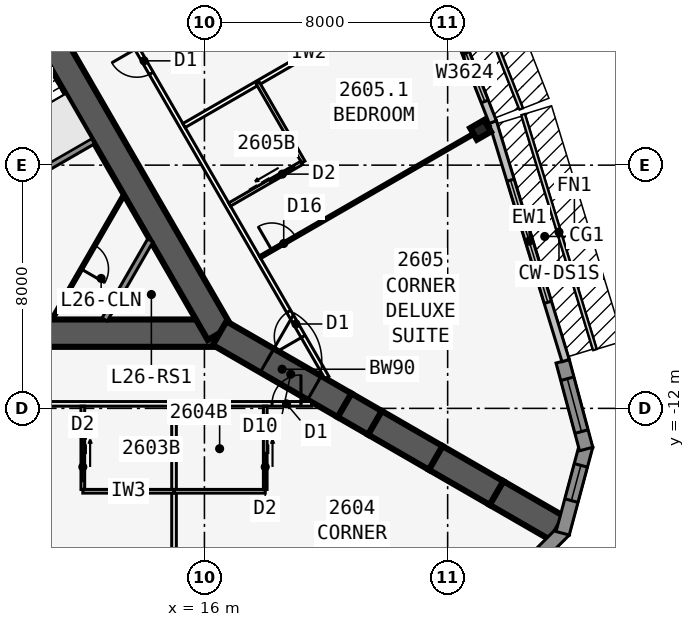
"""IFC4 building model, lengths in metres.
Left out: names, types, materials, properties, quantities, classifications, styles, units other than length and angle.
Written with IfcOpenShell. Run it as: python <this file> out.ifc"""

import sys

from ifc_helpers import new_model, si_unit, direction, frame, frame_2d, origin, origin_2d, place, context, subcontext, project, spatial, polyline, rectangle, i_section, outline, extrude, element, fill, save


model = new_model("IFC4")
c1 = context("Model", 3, precision=1e-05, world=origin(), true_north=direction((0.0, 1.0)))
c2 = subcontext(c1, "Body", "Model", "MODEL_VIEW")
j1 = project(units=[si_unit("LENGTHUNIT", "METRE"), si_unit("PLANEANGLEUNIT", "RADIAN")], contexts=[c1])
p1 = place(None, origin())
s1 = spatial("IfcSite", under=j1, at=p1, CompositionType="ELEMENT")
p2 = place(p1, origin())
s2 = spatial("IfcBuilding", under=s1, at=p2, CompositionType="ELEMENT")
p3 = place(p2, frame((0.0, 0.0, 99.9)))
s3 = spatial("IfcBuildingStorey", under=s2, at=p3, CompositionType="ELEMENT", Elevation=99.9)
p4 = place(p3, frame((-16.5, -9.526, 0.0), z_axis=(0.0, 0.0, 1.0), x_axis=(1.0, 0.0, 0.0)))
e1 = element("IfcWall", 1, at=p4, inside=s3, PredefinedType="SHEAR", context=c2, shape_type="SweptSolid", body=[
    extrude(rectangle(XDim=33.0, YDim=0.9, at=frame_2d((16.5, 0.0))), origin(), (0.0, 0.0, 1.0), 3.4),
])
p5 = place(p4, frame((14.05, 0.0, 0.0)))
e2 = element("IfcOpeningElement", 2, at=p5, cuts=e1, PredefinedType="OPENING", context=c2, shape_type="SweptSolid", body=[
    extrude(rectangle(XDim=1.8, YDim=2.13, at=frame_2d((0.9, 1.065))), frame((0.0, 0.46, 0.0), z_axis=(0.0, -1.0, 0.0), x_axis=(1.0, 0.0, 0.0)), (0.0, 0.0, 1.0), 0.92),
])
p6 = place(p3, frame((16.5, -9.526, 0.0), z_axis=(0.0, 0.0, 1.0), x_axis=(-0.499999749417, 0.866025548458, 0.0)))
e3 = element("IfcWall", 3, at=p6, inside=s3, PredefinedType="SHEAR", context=c2, shape_type="SweptSolid", body=[
    extrude(rectangle(XDim=33.0, YDim=0.9, at=frame_2d((16.5, 0.0))), origin(), (0.0, 0.0, 1.0), 3.4),
])
p7 = place(p6, frame((14.15, 0.0, 0.0)))
e4 = element("IfcOpeningElement", 4, at=p7, cuts=e3, PredefinedType="OPENING", context=c2, shape_type="SweptSolid", body=[
    extrude(rectangle(XDim=1.8, YDim=2.13, at=frame_2d((0.9, 1.065))), frame((0.0, 0.46, 0.0), z_axis=(0.0, -1.0, 0.0), x_axis=(1.0, 0.0, 0.0)), (0.0, 0.0, 1.0), 0.92),
])
p8 = place(p6, frame((12.6, 0.0, 0.0)))
e5 = element("IfcOpeningElement", 5, at=p8, cuts=e3, PredefinedType="OPENING", context=c2, shape_type="SweptSolid", body=[
    extrude(rectangle(XDim=1.0, YDim=2.13, at=frame_2d((0.5, 1.065))), frame((0.0, 0.46, 0.0), z_axis=(0.0, -1.0, 0.0), x_axis=(1.0, 0.0, 0.0)), (0.0, 0.0, 1.0), 0.92),
])
p9 = place(p3, frame((9.629, -4.775, 0.0), z_axis=(0.0, 0.0, 1.0), x_axis=(0.866022959057, 0.500004234368, 0.0)))
e6 = element("IfcWall", 6, at=p9, inside=s3, PredefinedType="SOLIDWALL", context=c2, shape_type="SweptSolid", body=[
    extrude(rectangle(XDim=3.125, YDim=0.2, at=frame_2d((1.562, 0.0))), origin(), (0.0, 0.0, 1.0), 3.15),
])
p10 = place(p3, frame((16.5, -9.526, 0.0), z_axis=(0.0, 0.0, 1.0), x_axis=(0.866031398331, -0.499989616998, 0.0)))
e7 = element("IfcWall", 7, at=p10, inside=s3, PredefinedType="SHEAR", context=c2, shape_type="SweptSolid", body=[
    extrude(rectangle(XDim=4.746, YDim=0.9, at=frame_2d((2.373, 0.0))), origin(), (0.0, 0.0, 1.0), 3.4),
])
p11 = place(p10, frame((1.8, 0.0, 0.0)))
e8 = element("IfcOpeningElement", 8, at=p11, cuts=e7, PredefinedType="OPENING", context=c2, shape_type="SweptSolid", body=[
    extrude(rectangle(XDim=1.8, YDim=2.13, at=frame_2d((0.9, 1.065))), frame((0.0, 0.46, 0.0), z_axis=(0.0, -1.0, 0.0), x_axis=(1.0, 0.0, 0.0)), (0.0, 0.0, 1.0), 0.92),
])
p12 = place(p3, frame((20.61, -11.899, 0.0), z_axis=(0.0, 0.0, 1.0), x_axis=(0.866009537788, -0.500027479704, 0.0)))
e9 = element("IfcWall", 9, at=p12, inside=s3, PredefinedType="SHEAR", context=c2, shape_type="SweptSolid", body=[
    extrude(rectangle(XDim=1.155, YDim=0.9, at=frame_2d((0.577, 0.0))), origin(), (0.0, 0.0, 1.0), 3.4),
])
for number, where, z_axis, x_axis in (
    (10, (21.61, -12.477, 0.0), (0.0, 0.0, 1.0), (0.866, -0.5, 0.0)),
    (11, (23.61, -13.631, 0.0), (0.0, 0.0, 1.0), (0.866, -0.5, 0.0)),
    (12, (25.61, -14.786, 0.0), (0.0, 0.0, 1.0), (0.866, -0.5, 0.0)),
):
    element("IfcWall", number, at=place(p3, frame(where, z_axis=z_axis, x_axis=x_axis)), inside=s3, PredefinedType="SHEAR", context=c2, shape_type="SweptSolid", body=[
        extrude(rectangle(XDim=2.309, YDim=0.9, at=frame_2d((1.155, 0.0))), origin(), (0.0, 0.0, 1.0), 3.4),
    ])
p13 = place(p3, frame((25.083, -2.839, 0.0), z_axis=(0.0, 0.0, 1.0), x_axis=(-0.5, 0.866025403784, 0.0)))
e13 = element("IfcColumn", 13, at=p13, inside=s3, PredefinedType="COLUMN", context=c2, shape_type="SweptSolid", body=[
    extrude(i_section(OverallWidth=0.442, OverallDepth=0.531, WebThickness=0.066, FlangeThickness=0.106, at=origin_2d()), origin(), (0.0, 0.0, 1.0), 3.4),
])
p14 = place(p3, frame((25.728, -18.12, 0.0), z_axis=(0.0, 0.0, 1.0), x_axis=(0.707025086683, 0.707188466253, 0.0)))
e14 = element("IfcWall", 14, at=p14, inside=s3, PredefinedType="SOLIDWALL", context=c2, shape_type="SweptSolid", body=[
    extrude(outline(polyline([(2.989, 0.225), (2.93, 0.225), (2.438, 0.093), (2.402, 0.225), (0.0, 0.225), (0.0, -0.225), (2.989, -0.225), (2.989, 0.225)])), origin(), (0.0, 0.0, 1.0), 3.15),
])
p15 = place(p14, frame((0.676, 0.0, 0.45)))
e15 = element("IfcOpeningElement", 15, at=p15, cuts=e14, PredefinedType="OPENING", context=c2, shape_type="SweptSolid", body=[
    extrude(rectangle(XDim=1.2, YDim=2.4, at=frame_2d((0.6, 1.2))), frame((0.0, 0.235, 0.0), z_axis=(0.0, -1.0, 0.0), x_axis=(1.0, 0.0, 0.0)), (0.0, 0.0, 1.0), 0.47),
])
p16 = place(p3, frame((27.783, -16.108, 0.0), z_axis=(0.0, 0.0, 1.0), x_axis=(0.258801419081, 0.965930548995, 0.0)))
e16 = element("IfcWall", 16, at=p16, inside=s3, PredefinedType="SOLIDWALL", context=c2, shape_type="SweptSolid", body=[
    extrude(outline(polyline([(2.989, 0.225), (0.586, 0.225), (0.551, 0.093), (0.06, 0.225), (0.0, 0.225), (0.0, -0.225), (2.989, -0.225), (2.989, 0.225)])), origin(), (0.0, 0.0, 1.0), 3.15),
])
p17 = place(p16, frame((1.113, 0.0, 0.45)))
e17 = element("IfcOpeningElement", 17, at=p17, cuts=e16, PredefinedType="OPENING", context=c2, shape_type="SweptSolid", body=[
    extrude(rectangle(XDim=1.2, YDim=2.4, at=frame_2d((0.6, 1.2))), frame((0.0, 0.235, 0.0), z_axis=(0.0, -1.0, 0.0), x_axis=(1.0, 0.0, 0.0)), (0.0, 0.0, 1.0), 0.47),
])
p18 = place(p3, frame((28.556, -13.337, 0.0), z_axis=(0.0, 0.0, 1.0), x_axis=(-0.258780998834, 0.965936019953, 0.0)))
e18 = element("IfcWall", 18, at=p18, inside=s3, PredefinedType="SOLIDWALL", context=c2, shape_type="SweptSolid", body=[
    extrude(rectangle(XDim=2.989, YDim=0.45, at=frame_2d((1.494, 0.0))), origin(), (0.0, 0.0, 1.0), 3.15),
])
p19 = place(p18, frame((0.594, 0.0, 0.45)))
e19 = element("IfcOpeningElement", 19, at=p19, cuts=e18, PredefinedType="OPENING", context=c2, shape_type="SweptSolid", body=[
    extrude(rectangle(XDim=1.8, YDim=2.4, at=frame_2d((0.9, 1.2))), frame((0.0, 0.235, 0.0), z_axis=(0.0, -1.0, 0.0), x_axis=(1.0, 0.0, 0.0)), (0.0, 0.0, 1.0), 0.47),
])
p20 = place(p3, frame((27.88, -10.429, 0.0), z_axis=(0.0, 0.0, 1.0), x_axis=(-0.2919790669, 0.956424709265, 0.0)))
e20 = element("IfcWall", 20, at=p20, inside=s3, PredefinedType="STANDARD", context=c2, shape_type="SweptSolid", body=[
    extrude(rectangle(XDim=8.211, YDim=0.25, at=frame_2d((4.105, 0.0))), origin(), (0.0, 0.0, 1.0), 3.15),
])
p21 = place(p20, frame((2.006, 0.0, 0.45)))
e21 = element("IfcOpeningElement", 21, at=p21, cuts=e20, PredefinedType="OPENING", context=c2, shape_type="SweptSolid", body=[
    extrude(rectangle(XDim=4.2, YDim=2.4, at=frame_2d((2.1, 1.2))), frame((0.0, 0.135, 0.0), z_axis=(0.0, -1.0, 0.0), x_axis=(1.0, 0.0, 0.0)), (0.0, 0.0, 1.0), 0.27),
])
p22 = place(p3, frame((25.486, -2.584, 0.0), z_axis=(0.0, 0.0, 1.0), x_axis=(-0.364013463868, 0.931393685894, 0.0)))
e22 = element("IfcWall", 22, at=p22, inside=s3, PredefinedType="STANDARD", context=c2, shape_type="SweptSolid", body=[
    extrude(rectangle(XDim=5.058, YDim=0.25, at=frame_2d((2.529, 0.0))), origin(), (0.0, 0.0, 1.0), 3.15),
])
p23 = place(p22, frame((0.729, 0.0, 0.45)))
e23 = element("IfcOpeningElement", 23, at=p23, cuts=e22, PredefinedType="OPENING", context=c2, shape_type="SweptSolid", body=[
    extrude(rectangle(XDim=3.6, YDim=2.4, at=frame_2d((1.8, 1.2))), frame((0.0, 0.135, 0.0), z_axis=(0.0, -1.0, 0.0), x_axis=(1.0, 0.0, 0.0)), (0.0, 0.0, 1.0), 0.27),
])
p24 = place(p3, frame((-19.527, -11.851, 0.0), z_axis=(0.0, 0.0, 1.0), x_axis=(1.0, 0.0, 0.0)))
e24 = element("IfcWall", 24, at=p24, inside=s3, PredefinedType="PARTITIONING", context=c2, shape_type="SweptSolid", body=[
    extrude(rectangle(XDim=39.054, YDim=0.15, at=frame_2d((19.527, 0.0))), origin(), (0.0, 0.0, 1.0), 3.15),
])
p25 = place(p24, frame((1.558, 0.0, 0.0)))
e25 = element("IfcOpeningElement", 25, at=p25, cuts=e24, PredefinedType="OPENING", context=c2, shape_type="SweptSolid", body=[
    extrude(rectangle(XDim=0.95, YDim=2.13, at=frame_2d((0.475, 1.065))), frame((0.0, 0.085, 0.0), z_axis=(0.0, -1.0, 0.0), x_axis=(1.0, 0.0, 0.0)), (0.0, 0.0, 1.0), 0.17),
])
p26 = place(p24, frame((11.552, 0.0, 0.0)))
e26 = element("IfcOpeningElement", 26, at=p26, cuts=e24, PredefinedType="OPENING", context=c2, shape_type="SweptSolid", body=[
    extrude(rectangle(XDim=0.95, YDim=2.13, at=frame_2d((0.475, 1.065))), frame((0.0, 0.085, 0.0), z_axis=(0.0, -1.0, 0.0), x_axis=(1.0, 0.0, 0.0)), (0.0, 0.0, 1.0), 0.17),
])
p27 = place(p24, frame((21.527, 0.0, 0.0)))
e27 = element("IfcOpeningElement", 27, at=p27, cuts=e24, PredefinedType="OPENING", context=c2, shape_type="SweptSolid", body=[
    extrude(rectangle(XDim=1.0, YDim=2.13, at=frame_2d((0.5, 1.065))), frame((0.0, 0.085, 0.0), z_axis=(0.0, -1.0, 0.0), x_axis=(1.0, 0.0, 0.0)), (0.0, 0.0, 1.0), 0.17),
])
p28 = place(p24, frame((26.552, 0.0, 0.0)))
e28 = element("IfcOpeningElement", 28, at=p28, cuts=e24, PredefinedType="OPENING", context=c2, shape_type="SweptSolid", body=[
    extrude(rectangle(XDim=0.95, YDim=2.13, at=frame_2d((0.475, 1.065))), frame((0.0, 0.085, 0.0), z_axis=(0.0, -1.0, 0.0), x_axis=(1.0, 0.0, 0.0)), (0.0, 0.0, 1.0), 0.17),
])
p29 = place(p24, frame((37.752, 0.0, 0.0)))
e29 = element("IfcOpeningElement", 29, at=p29, cuts=e24, PredefinedType="OPENING", context=c2, shape_type="SweptSolid", body=[
    extrude(rectangle(XDim=0.95, YDim=2.13, at=frame_2d((0.475, 1.065))), frame((0.0, 0.085, 0.0), z_axis=(0.0, -1.0, 0.0), x_axis=(1.0, 0.0, 0.0)), (0.0, 0.0, 1.0), 0.17),
])
p30 = place(p3, frame((15.0, -11.926, 0.0), z_axis=(0.0, 0.0, 1.0), x_axis=(0.0, -1.0, 0.0)))
e30 = element("IfcWall", 30, at=p30, inside=s3, PredefinedType="PARTITIONING", context=c2, shape_type="SweptSolid", body=[
    extrude(rectangle(XDim=8.72, YDim=0.15, at=frame_2d((4.36, 0.0))), origin(), (0.0, 0.0, 1.0), 2.05),
])
p31 = place(p3, frame((12.0, -14.726, 0.0), z_axis=(0.0, 0.0, 1.0), x_axis=(1.0, 0.0, 0.0)))
e31 = element("IfcWall", 31, at=p31, inside=s3, PredefinedType="PLUMBINGWALL", context=c2, shape_type="SweptSolid", body=[
    extrude(rectangle(XDim=3.0, YDim=0.12, at=frame_2d((1.5, 0.0))), origin(), (0.0, 0.0, 1.0), 3.15),
])
p32 = place(p3, frame((12.0, -11.926, 0.0), z_axis=(0.0, 0.0, 1.0), x_axis=(0.0, -1.0, 0.0)))
e32 = element("IfcWall", 32, at=p32, inside=s3, PredefinedType="PLUMBINGWALL", context=c2, shape_type="SweptSolid", body=[
    extrude(rectangle(XDim=2.74, YDim=0.12, at=frame_2d((1.37, 0.0))), origin(), (0.0, 0.0, 1.0), 3.15),
])
p33 = place(p32, frame((1.55, 0.0, 0.0)))
e33 = element("IfcOpeningElement", 33, at=p33, cuts=e32, PredefinedType="OPENING", context=c2, shape_type="SweptSolid", body=[
    extrude(rectangle(XDim=0.9, YDim=2.13, at=frame_2d((0.45, 1.065))), frame((0.0, 0.07, 0.0), z_axis=(0.0, -1.0, 0.0), x_axis=(1.0, 0.0, 0.0)), (0.0, 0.0, 1.0), 0.14),
])
p34 = place(p3, frame((15.0, -14.726, 0.0), z_axis=(0.0, 0.0, 1.0), x_axis=(1.0, 0.0, 0.0)))
e34 = element("IfcWall", 34, at=p34, inside=s3, PredefinedType="PLUMBINGWALL", context=c2, shape_type="SweptSolid", body=[
    extrude(rectangle(XDim=3.0, YDim=0.12, at=frame_2d((1.5, 0.0))), origin(), (0.0, 0.0, 1.0), 3.15),
])
p35 = place(p3, frame((18.0, -11.926, 0.0), z_axis=(0.0, 0.0, 1.0), x_axis=(0.0, -1.0, 0.0)))
e35 = element("IfcWall", 35, at=p35, inside=s3, PredefinedType="PLUMBINGWALL", context=c2, shape_type="SweptSolid", body=[
    extrude(rectangle(XDim=2.74, YDim=0.12, at=frame_2d((1.37, 0.0))), origin(), (0.0, 0.0, 1.0), 3.15),
])
p36 = place(p35, frame((1.55, 0.0, 0.0)))
e36 = element("IfcOpeningElement", 36, at=p36, cuts=e35, PredefinedType="OPENING", context=c2, shape_type="SweptSolid", body=[
    extrude(rectangle(XDim=0.9, YDim=2.13, at=frame_2d((0.45, 1.065))), frame((0.0, 0.07, 0.0), z_axis=(0.0, -1.0, 0.0), x_axis=(1.0, 0.0, 0.0)), (0.0, 0.0, 1.0), 0.14),
])
p37 = place(p3, frame((20.027, -10.985, 0.0), z_axis=(0.0, 0.0, 1.0), x_axis=(-0.500001677587, 0.866024435227, 0.0)))
e37 = element("IfcWall", 37, at=p37, inside=s3, PredefinedType="PARTITIONING", context=c2, shape_type="SweptSolid", body=[
    extrude(rectangle(XDim=39.054, YDim=0.15, at=frame_2d((19.527, 0.0))), origin(), (0.0, 0.0, 1.0), 3.15),
])
p38 = place(p37, frame((1.558, 0.0, 0.0)))
e38 = element("IfcOpeningElement", 38, at=p38, cuts=e37, PredefinedType="OPENING", context=c2, shape_type="SweptSolid", body=[
    extrude(rectangle(XDim=0.95, YDim=2.13, at=frame_2d((0.475, 1.065))), frame((0.0, 0.085, 0.0), z_axis=(0.0, -1.0, 0.0), x_axis=(1.0, 0.0, 0.0)), (0.0, 0.0, 1.0), 0.17),
])
p39 = place(p37, frame((11.552, 0.0, 0.0)))
e39 = element("IfcOpeningElement", 39, at=p39, cuts=e37, PredefinedType="OPENING", context=c2, shape_type="SweptSolid", body=[
    extrude(rectangle(XDim=0.95, YDim=2.13, at=frame_2d((0.475, 1.065))), frame((0.0, 0.085, 0.0), z_axis=(0.0, -1.0, 0.0), x_axis=(1.0, 0.0, 0.0)), (0.0, 0.0, 1.0), 0.17),
])
p40 = place(p37, frame((22.752, 0.0, 0.0)))
e40 = element("IfcOpeningElement", 40, at=p40, cuts=e37, PredefinedType="OPENING", context=c2, shape_type="SweptSolid", body=[
    extrude(rectangle(XDim=0.95, YDim=2.13, at=frame_2d((0.475, 1.065))), frame((0.0, 0.085, 0.0), z_axis=(0.0, -1.0, 0.0), x_axis=(1.0, 0.0, 0.0)), (0.0, 0.0, 1.0), 0.17),
])
p41 = place(p37, frame((36.546, 0.0, 0.0)))
e41 = element("IfcOpeningElement", 41, at=p41, cuts=e37, PredefinedType="OPENING", context=c2, shape_type="SweptSolid", body=[
    extrude(rectangle(XDim=0.95, YDim=2.13, at=frame_2d((0.475, 1.065))), frame((0.0, 0.085, 0.0), z_axis=(0.0, -1.0, 0.0), x_axis=(1.0, 0.0, 0.0)), (0.0, 0.0, 1.0), 0.17),
])
p42 = place(p3, frame((17.829, -7.027, 0.0), z_axis=(0.0, 0.0, 1.0), x_axis=(0.866032659912, 0.499987431809, 0.0)))
e42 = element("IfcWall", 42, at=p42, inside=s3, PredefinedType="PARTITIONING", context=c2, shape_type="SweptSolid", body=[
    extrude(rectangle(XDim=8.72, YDim=0.1, at=frame_2d((4.36, 0.0))), origin(), (0.0, 0.0, 1.0), 2.05),
])
p43 = place(p42, frame((0.45, 0.0, 0.0)))
e43 = element("IfcOpeningElement", 43, at=p43, cuts=e42, PredefinedType="OPENING", context=c2, shape_type="SweptSolid", body=[
    extrude(rectangle(XDim=0.9, YDim=2.032, at=frame_2d((0.45, 1.016))), frame((0.0, 0.06, 0.0), z_axis=(0.0, -1.0, 0.0), x_axis=(1.0, 0.0, 0.0)), (0.0, 0.0, 1.0), 0.12),
])
p44 = place(p3, frame((15.329, -2.697, 0.0), z_axis=(0.0, 0.0, 1.0), x_axis=(0.866018409083, 0.500012114982, 0.0)))
e44 = element("IfcWall", 44, at=p44, inside=s3, PredefinedType="PARTITIONING", context=c2, shape_type="SweptSolid", body=[
    extrude(rectangle(XDim=9.485, YDim=0.15, at=frame_2d((4.742, 0.0))), origin(), (0.0, 0.0, 1.0), 2.109),
])
p45 = place(p3, frame((19.253, -3.895, 0.0), z_axis=(0.0, 0.0, 1.0), x_axis=(-0.499990139034, 0.866031096941, 0.0)))
e45 = element("IfcWall", 45, at=p45, inside=s3, PredefinedType="PLUMBINGWALL", context=c2, shape_type="SweptSolid", body=[
    extrude(rectangle(XDim=3.0, YDim=0.12, at=frame_2d((1.5, 0.0))), origin(), (0.0, 0.0, 1.0), 3.15),
])
p46 = place(p3, frame((16.829, -5.295, 0.0), z_axis=(0.0, 0.0, 1.0), x_axis=(0.866035715982, 0.499982138324, 0.0)))
e46 = element("IfcWall", 46, at=p46, inside=s3, PredefinedType="PLUMBINGWALL", context=c2, shape_type="SweptSolid", body=[
    extrude(rectangle(XDim=2.74, YDim=0.12, at=frame_2d((1.37, 0.0))), origin(), (0.0, 0.0, 1.0), 3.15),
])
p47 = place(p46, frame((1.55, 0.0, 0.0)))
e47 = element("IfcOpeningElement", 47, at=p47, cuts=e46, PredefinedType="OPENING", context=c2, shape_type="SweptSolid", body=[
    extrude(rectangle(XDim=0.9, YDim=2.13, at=frame_2d((0.45, 1.065))), frame((0.0, 0.07, 0.0), z_axis=(0.0, -1.0, 0.0), x_axis=(1.0, 0.0, 0.0)), (0.0, 0.0, 1.0), 0.14),
])
p48 = place(p3, frame((14.219, -6.476, 0.0), z_axis=(0.0, 0.0, 1.0), x_axis=(-0.499952404951, -0.866052881055, 0.0)))
e48 = element("IfcWall", 48, at=p48, inside=s3, PredefinedType="SOLIDWALL", context=c2, shape_type="SweptSolid", body=[
    extrude(rectangle(XDim=3.002, YDim=0.2, at=frame_2d((1.501, 0.0))), origin(), (0.0, 0.0, 1.0), 3.15),
])
p49 = place(p3, frame((13.354, -4.976, 0.0), z_axis=(0.0, 0.0, 1.0), x_axis=(-0.499999210213, -0.866025859768, 0.0)))
e49 = element("IfcWall", 49, at=p49, inside=s3, PredefinedType="PARTITIONING", context=c2, shape_type="SweptSolid", body=[
    extrude(rectangle(XDim=4.734, YDim=0.1, at=frame_2d((2.367, 0.0))), origin(), (0.0, 0.0, 1.0), 3.15),
])
p50 = place(p49, frame((1.917, 0.0, 0.0)))
e50 = element("IfcOpeningElement", 50, at=p50, cuts=e49, PredefinedType="OPENING", context=c2, shape_type="SweptSolid", body=[
    extrude(rectangle(XDim=0.9, YDim=2.13, at=frame_2d((0.45, 1.065))), frame((0.0, 0.06, 0.0), z_axis=(0.0, -1.0, 0.0), x_axis=(1.0, 0.0, 0.0)), (0.0, 0.0, 1.0), 0.12),
])
p51 = place(p17, origin())
e51 = element("IfcWindow", 51, at=p51, inside=s3, PartitioningType="SINGLE_PANEL", PredefinedType="WINDOW", context=c2, shape_type="SweptSolid", body=[
    extrude(rectangle(XDim=1.2, YDim=2.4, at=frame_2d((0.6, 1.2))), frame((0.0, 0.03, 0.0), z_axis=(0.0, -1.0, 0.0), x_axis=(1.0, 0.0, 0.0)), (0.0, 0.0, 1.0), 0.06),
])
fill(e17, e51)
p52 = place(p19, origin())
e52 = element("IfcWindow", 52, at=p52, inside=s3, PartitioningType="SINGLE_PANEL", PredefinedType="WINDOW", context=c2, shape_type="SweptSolid", body=[
    extrude(rectangle(XDim=1.8, YDim=2.4, at=frame_2d((0.9, 1.2))), frame((0.0, 0.03, 0.0), z_axis=(0.0, -1.0, 0.0), x_axis=(1.0, 0.0, 0.0)), (0.0, 0.0, 1.0), 0.06),
])
fill(e19, e52)
p53 = place(p21, origin())
e53 = element("IfcWindow", 53, at=p53, inside=s3, PartitioningType="SINGLE_PANEL", PredefinedType="WINDOW", context=c2, shape_type="SweptSolid", body=[
    extrude(rectangle(XDim=4.2, YDim=2.4, at=frame_2d((2.1, 1.2))), frame((0.0, 0.03, 0.0), z_axis=(0.0, -1.0, 0.0), x_axis=(1.0, 0.0, 0.0)), (0.0, 0.0, 1.0), 0.06),
])
fill(e21, e53)
p54 = place(p23, origin())
e54 = element("IfcWindow", 54, at=p54, inside=s3, PartitioningType="SINGLE_PANEL", PredefinedType="WINDOW", context=c2, shape_type="SweptSolid", body=[
    extrude(rectangle(XDim=3.6, YDim=2.4, at=frame_2d((1.8, 1.2))), frame((0.0, 0.03, 0.0), z_axis=(0.0, -1.0, 0.0), x_axis=(1.0, 0.0, 0.0)), (0.0, 0.0, 1.0), 0.06),
])
fill(e23, e54)
p55 = place(p33, origin())
e55 = element("IfcDoor", 55, at=p55, inside=s3, OperationType="SLIDING_TO_LEFT", PredefinedType="DOOR", context=c2, shape_type="SweptSolid", body=[
    extrude(rectangle(XDim=0.9, YDim=2.13, at=frame_2d((0.45, 1.065))), frame((0.0, 0.025, 0.0), z_axis=(0.0, -1.0, 0.0), x_axis=(1.0, 0.0, 0.0)), (0.0, 0.0, 1.0), 0.05),
])
fill(e33, e55)
p56 = place(p36, origin())
e56 = element("IfcDoor", 56, at=p56, inside=s3, OperationType="SLIDING_TO_LEFT", PredefinedType="DOOR", context=c2, shape_type="SweptSolid", body=[
    extrude(rectangle(XDim=0.9, YDim=2.13, at=frame_2d((0.45, 1.065))), frame((0.0, 0.025, 0.0), z_axis=(0.0, -1.0, 0.0), x_axis=(1.0, 0.0, 0.0)), (0.0, 0.0, 1.0), 0.05),
])
fill(e36, e56)
p57 = place(p29, origin())
e57 = element("IfcDoor", 57, at=p57, inside=s3, OperationType="SINGLE_SWING_RIGHT", PredefinedType="DOOR", context=c2, shape_type="SweptSolid", body=[
    extrude(rectangle(XDim=0.95, YDim=2.13, at=frame_2d((0.475, 1.065))), frame((0.0, 0.025, 0.0), z_axis=(0.0, -1.0, 0.0), x_axis=(1.0, 0.0, 0.0)), (0.0, 0.0, 1.0), 0.05),
])
fill(e29, e57)
p58 = place(p43, origin())
e58 = element("IfcDoor", 58, at=p58, inside=s3, OperationType="SINGLE_SWING_LEFT", PredefinedType="DOOR", context=c2, shape_type="SweptSolid", body=[
    extrude(rectangle(XDim=0.9, YDim=2.032, at=frame_2d((0.45, 1.016))), frame((0.0, 0.025, 0.0), z_axis=(0.0, -1.0, 0.0), x_axis=(1.0, 0.0, 0.0)), (0.0, 0.0, 1.0), 0.05),
])
fill(e43, e58)
p59 = place(p38, origin())
e59 = element("IfcDoor", 59, at=p59, inside=s3, OperationType="SINGLE_SWING_LEFT", PredefinedType="DOOR", context=c2, shape_type="SweptSolid", body=[
    extrude(rectangle(XDim=0.95, YDim=2.13, at=frame_2d((0.475, 1.065))), frame((0.0, 0.025, 0.0), z_axis=(0.0, -1.0, 0.0), x_axis=(1.0, 0.0, 0.0)), (0.0, 0.0, 1.0), 0.05),
])
fill(e38, e59)
p60 = place(p47, origin())
e60 = element("IfcDoor", 60, at=p60, inside=s3, OperationType="SLIDING_TO_LEFT", PredefinedType="DOOR", context=c2, shape_type="SweptSolid", body=[
    extrude(rectangle(XDim=0.9, YDim=2.13, at=frame_2d((0.45, 1.065))), frame((0.0, 0.025, 0.0), z_axis=(0.0, -1.0, 0.0), x_axis=(1.0, 0.0, 0.0)), (0.0, 0.0, 1.0), 0.05),
])
fill(e47, e60)
p61 = place(p39, origin())
e61 = element("IfcDoor", 61, at=p61, inside=s3, OperationType="SINGLE_SWING_RIGHT", PredefinedType="DOOR", context=c2, shape_type="SweptSolid", body=[
    extrude(rectangle(XDim=0.95, YDim=2.13, at=frame_2d((0.475, 1.065))), frame((0.0, 0.025, 0.0), z_axis=(0.0, -1.0, 0.0), x_axis=(1.0, 0.0, 0.0)), (0.0, 0.0, 1.0), 0.05),
])
fill(e39, e61)
p62 = place(p11, origin())
e62 = element("IfcDoor", 62, at=p62, inside=s3, OperationType="DOUBLE_DOOR_DOUBLE_SWING", PredefinedType="DOOR", context=c2, shape_type="SweptSolid", body=[
    extrude(rectangle(XDim=1.8, YDim=2.13, at=frame_2d((0.9, 1.065))), frame((0.0, 0.025, 0.0), z_axis=(0.0, -1.0, 0.0), x_axis=(1.0, 0.0, 0.0)), (0.0, 0.0, 1.0), 0.05),
])
fill(e8, e62)
p63 = place(p50, origin())
e63 = element("IfcDoor", 63, at=p63, inside=s3, OperationType="SINGLE_SWING_RIGHT", PredefinedType="DOOR", context=c2, shape_type="SweptSolid", body=[
    extrude(rectangle(XDim=0.9, YDim=2.13, at=frame_2d((0.45, 1.065))), frame((0.0, 0.025, 0.0), z_axis=(0.0, -1.0, 0.0), x_axis=(1.0, 0.0, 0.0)), (0.0, 0.0, 1.0), 0.05),
])
fill(e50, e63)
save(model, sys.argv[1])
